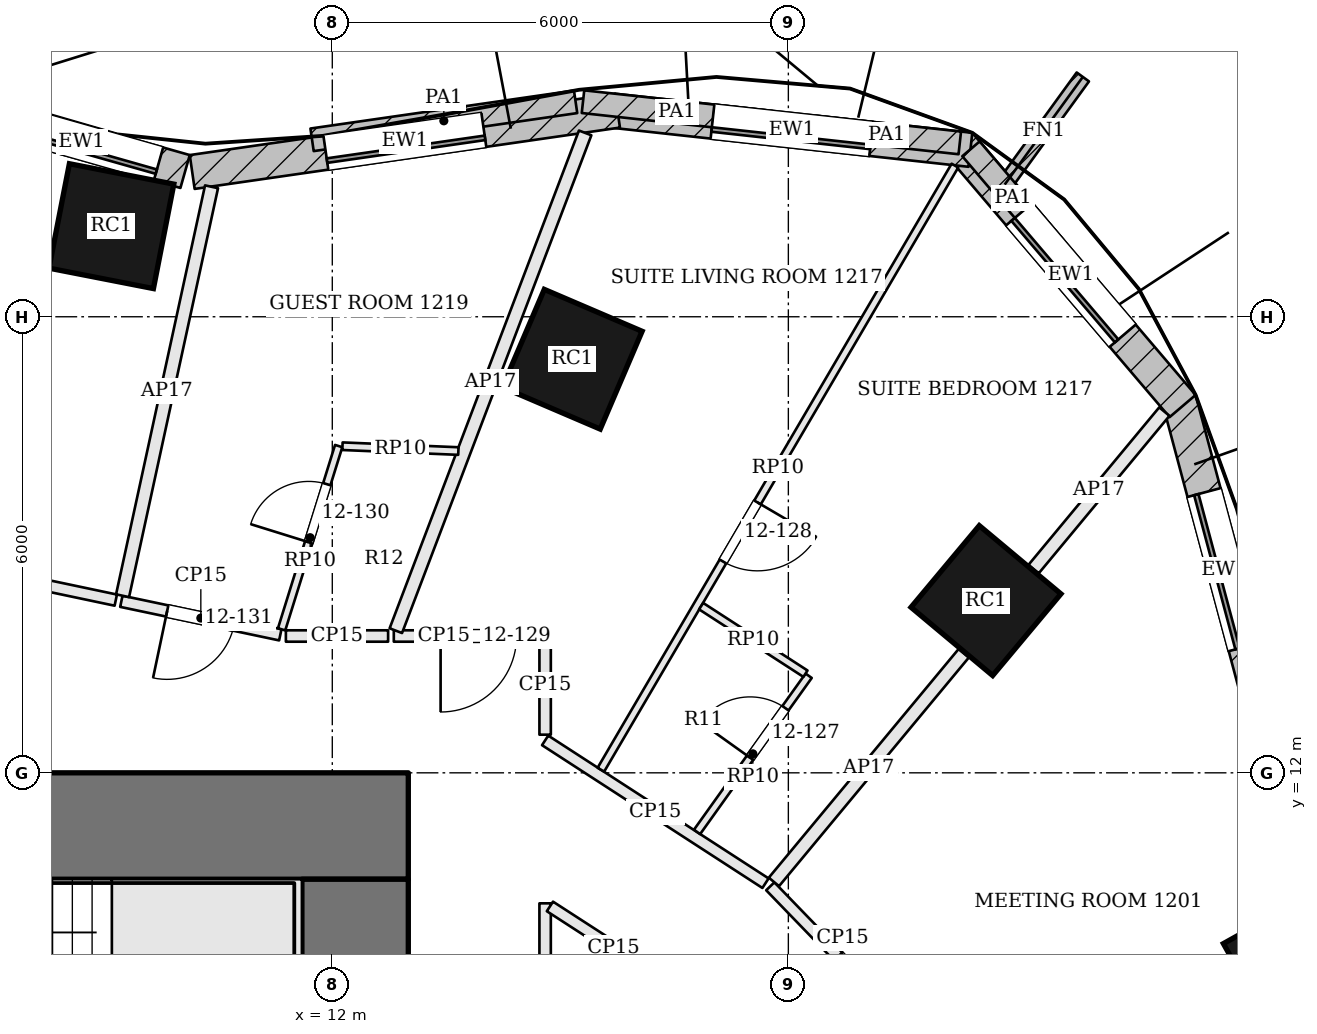
"""IFC4 building model, lengths in metres.
Left out: names, types, materials, properties, quantities, classifications, styles, units other than length and angle.
Written with IfcOpenShell. Run it as: python <this file> out.ifc"""

import sys

from ifc_helpers import new_model, si_unit, direction, frame, frame_2d, origin, origin_2d, place, context, subcontext, project, spatial, rectangle, extrude, element, fill, save


model = new_model("IFC4")
c1 = context("Model", 3, precision=1e-05, world=origin(), true_north=direction((0.0, 1.0)))
c2 = subcontext(c1, "Body", "Model", "MODEL_VIEW")
j1 = project(units=[si_unit("LENGTHUNIT", "METRE"), si_unit("PLANEANGLEUNIT", "RADIAN")], contexts=[c1])
p1 = place(None, origin())
s1 = spatial("IfcSite", under=j1, at=p1, CompositionType="ELEMENT")
p2 = place(p1, origin())
s2 = spatial("IfcBuilding", under=s1, at=p2, CompositionType="ELEMENT")
p3 = place(p2, frame((0.0, 0.0, 59.1)))
s3 = spatial("IfcBuildingStorey", under=s2, at=p3, CompositionType="ELEMENT", Elevation=59.1)
p4 = place(p3, frame((-13.0, 11.3, 0.0), z_axis=(0.0, 0.0, 1.0), x_axis=(1.0, 0.0, 0.0)))
e1 = element("IfcWall", 1, at=p4, inside=s3, PredefinedType="SHEAR", context=c2, shape_type="SweptSolid", body=[
    extrude(rectangle(XDim=26.0, YDim=1.4, at=frame_2d((13.0, 0.0))), origin(), (0.0, 0.0, 1.0), 3.6),
])
p5 = place(p4, frame((8.825, 0.0, 0.0)))
e2 = element("IfcOpeningElement", 2, at=p5, cuts=e1, PredefinedType="OPENING", context=c2, shape_type="SweptSolid", body=[
    extrude(rectangle(XDim=1.0, YDim=2.1, at=frame_2d((0.5, 1.05))), frame((0.0, 0.71, 0.0), z_axis=(0.0, -1.0, 0.0), x_axis=(1.0, 0.0, 0.0)), (0.0, 0.0, 1.0), 1.42),
])
p6 = place(p4, frame((12.1, 0.0, 0.0)))
e3 = element("IfcOpeningElement", 3, at=p6, cuts=e1, PredefinedType="OPENING", context=c2, shape_type="SweptSolid", body=[
    extrude(rectangle(XDim=1.0, YDim=2.1, at=frame_2d((0.5, 1.05))), frame((0.0, 0.71, 0.0), z_axis=(0.0, -1.0, 0.0), x_axis=(1.0, 0.0, 0.0)), (0.0, 0.0, 1.0), 1.42),
])
p7 = place(p4, frame((15.125, 0.0, 0.0)))
e4 = element("IfcOpeningElement", 4, at=p7, cuts=e1, PredefinedType="OPENING", context=c2, shape_type="SweptSolid", body=[
    extrude(rectangle(XDim=0.7, YDim=2.1, at=frame_2d((0.35, 1.05))), frame((0.0, 0.71, 0.0), z_axis=(0.0, -1.0, 0.0), x_axis=(1.0, 0.0, 0.0)), (0.0, 0.0, 1.0), 1.42),
])
p8 = place(p4, frame((16.65, 0.0, 0.0)))
e5 = element("IfcOpeningElement", 5, at=p8, cuts=e1, PredefinedType="OPENING", context=c2, shape_type="SweptSolid", body=[
    extrude(rectangle(XDim=0.9, YDim=2.1, at=frame_2d((0.45, 1.05))), frame((0.0, 0.71, 0.0), z_axis=(0.0, -1.0, 0.0), x_axis=(1.0, 0.0, 0.0)), (0.0, 0.0, 1.0), 1.42),
])
p9 = place(p3, frame((12.3, -1.6, 0.0), z_axis=(0.0, 0.0, 1.0), x_axis=(0.0, 1.0, 0.0)))
e6 = element("IfcWall", 6, at=p9, inside=s3, PredefinedType="SHEAR", context=c2, shape_type="SweptSolid", body=[
    extrude(rectangle(XDim=12.2, YDim=1.4, at=frame_2d((6.1, 0.0))), origin(), (0.0, 0.0, 1.0), 3.6),
])
p10 = place(p9, frame((6.8, 0.0, 0.0)))
e7 = element("IfcOpeningElement", 7, at=p10, cuts=e6, PredefinedType="OPENING", context=c2, shape_type="SweptSolid", body=[
    extrude(rectangle(XDim=1.8, YDim=2.1, at=frame_2d((0.9, 1.05))), frame((0.0, 0.71, 0.0), z_axis=(0.0, -1.0, 0.0), x_axis=(1.0, 0.0, 0.0)), (0.0, 0.0, 1.0), 1.42),
])
for number, where, z_axis, x_axis in (
    (8, (24.676, 9.483, 0.0), (0.0, 0.0, 1.0), (-0.487, 0.873, 0.0)),
    (9, (20.6, 14.266, 0.0), (0.0, 0.0, 1.0), (-0.767, 0.641, 0.0)),
    (10, (15.157, 17.441, 0.0), (0.0, 0.0, 1.0), (-0.919, 0.394, 0.0)),
    (11, (9.094, 19.192, 0.0), (0.0, 0.0, 1.0), (-0.981, 0.192, 0.0)),
):
    element("IfcColumn", number, at=place(p3, frame(where, z_axis=z_axis, x_axis=x_axis)), inside=s3, PredefinedType="COLUMN", context=c2, shape_type="SweptSolid", body=[
        extrude(rectangle(XDim=1.4, YDim=1.4, at=origin_2d()), origin(), (0.0, 0.0, 1.0), 3.6),
    ])
p11 = place(p3, frame((24.337, 12.439, 0.0), z_axis=(0.0, 0.0, 1.0), x_axis=(-0.258441377569, 0.966026942875, 0.0)))
e12 = element("IfcWall", 12, at=p11, inside=s3, PredefinedType="SOLIDWALL", context=c2, shape_type="SweptSolid", body=[
    extrude(rectangle(XDim=4.624, YDim=0.45, at=frame_2d((2.312, 0.0))), origin(), (0.0, 0.0, 1.0), 3.4),
])
p12 = place(p11, frame((1.262, 0.0, 0.9)))
e13 = element("IfcOpeningElement", 13, at=p12, cuts=e12, PredefinedType="OPENING", context=c2, shape_type="SweptSolid", body=[
    extrude(rectangle(XDim=2.1, YDim=2.0, at=frame_2d((1.05, 1.0))), frame((0.0, 0.235, 0.0), z_axis=(0.0, -1.0, 0.0), x_axis=(1.0, 0.0, 0.0)), (0.0, 0.0, 1.0), 0.47),
])
p13 = place(p3, frame((23.187, 16.825, 0.0), z_axis=(0.0, 0.0, 1.0), x_axis=(-0.648462985992, 0.761246186065, 0.0)))
e14 = element("IfcWall", 14, at=p13, inside=s3, PredefinedType="SOLIDWALL", context=c2, shape_type="SweptSolid", body=[
    extrude(rectangle(XDim=4.531, YDim=0.45, at=frame_2d((2.265, 0.0))), origin(), (0.0, 0.0, 1.0), 3.4),
])
p14 = place(p13, frame((1.215, 0.0, 0.9)))
e15 = element("IfcOpeningElement", 15, at=p14, cuts=e14, PredefinedType="OPENING", context=c2, shape_type="SweptSolid", body=[
    extrude(rectangle(XDim=2.1, YDim=2.0, at=frame_2d((1.05, 1.0))), frame((0.0, 0.235, 0.0), z_axis=(0.0, -1.0, 0.0), x_axis=(1.0, 0.0, 0.0)), (0.0, 0.0, 1.0), 0.47),
])
p15 = place(p3, frame((20.396, 20.196, 0.0), z_axis=(0.0, 0.0, 1.0), x_axis=(-0.994063142291, 0.108804729393, 0.0)))
e16 = element("IfcWall", 16, at=p15, inside=s3, PredefinedType="SOLIDWALL", context=c2, shape_type="SweptSolid", body=[
    extrude(rectangle(XDim=4.728, YDim=0.45, at=frame_2d((2.364, 0.0))), origin(), (0.0, 0.0, 1.0), 3.4),
])
p16 = place(p15, frame((1.314, 0.0, 0.9)))
e17 = element("IfcOpeningElement", 17, at=p16, cuts=e16, PredefinedType="OPENING", context=c2, shape_type="SweptSolid", body=[
    extrude(rectangle(XDim=2.1, YDim=2.0, at=frame_2d((1.05, 1.0))), frame((0.0, 0.235, 0.0), z_axis=(0.0, -1.0, 0.0), x_axis=(1.0, 0.0, 0.0)), (0.0, 0.0, 1.0), 0.47),
])
p17 = place(p3, frame((15.752, 20.711, 0.0), z_axis=(0.0, 0.0, 1.0), x_axis=(-0.989761192351, -0.142733255115, 0.0)))
e18 = element("IfcWall", 18, at=p17, inside=s3, PredefinedType="SOLIDWALL", context=c2, shape_type="SweptSolid", body=[
    extrude(rectangle(XDim=5.653, YDim=0.45, at=frame_2d((2.827, 0.0))), origin(), (0.0, 0.0, 1.0), 3.4),
])
p18 = place(p17, frame((1.777, 0.0, 0.9)))
e19 = element("IfcOpeningElement", 19, at=p18, cuts=e18, PredefinedType="OPENING", context=c2, shape_type="SweptSolid", body=[
    extrude(rectangle(XDim=2.1, YDim=2.0, at=frame_2d((1.05, 1.0))), frame((0.0, 0.235, 0.0), z_axis=(0.0, -1.0, 0.0), x_axis=(1.0, 0.0, 0.0)), (0.0, 0.0, 1.0), 0.47),
])
p19 = place(p3, frame((10.063, 19.911, 0.0), z_axis=(0.0, 0.0, 1.0), x_axis=(-0.961982029567, 0.273112751057, 0.0)))
e20 = element("IfcWall", 20, at=p19, inside=s3, PredefinedType="SOLIDWALL", context=c2, shape_type="SweptSolid", body=[
    extrude(rectangle(XDim=2.827, YDim=0.45, at=frame_2d((1.414, 0.0))), origin(), (0.0, 0.0, 1.0), 3.4),
])
p20 = place(p19, frame((0.364, 0.0, 0.9)))
e21 = element("IfcOpeningElement", 21, at=p20, cuts=e20, PredefinedType="OPENING", context=c2, shape_type="SweptSolid", body=[
    extrude(rectangle(XDim=2.1, YDim=2.0, at=frame_2d((1.05, 1.0))), frame((0.0, 0.235, 0.0), z_axis=(0.0, -1.0, 0.0), x_axis=(1.0, 0.0, 0.0)), (0.0, 0.0, 1.0), 0.47),
])
p21 = place(p3, frame((20.846, 19.739, 0.0), z_axis=(0.0, 0.0, 1.0), x_axis=(0.587607490034, 0.809146116382, 0.0)))
e22 = element("IfcWall", 22, at=p21, inside=s3, PredefinedType="SOLIDWALL", context=c2, shape_type="SweptSolid", body=[
    extrude(rectangle(XDim=1.75, YDim=0.2, at=frame_2d((0.875, 0.0))), origin(), (0.0, 0.0, 1.0), 3.4),
])
p22 = place(p3, frame((21.513, 18.906, 3.6), z_axis=(0.0, 0.0, 1.0), x_axis=(-0.648451151452, 0.761256267088, 0.0)))
e23 = element("IfcWall", 23, at=p22, inside=s3, PredefinedType="PARAPET", context=c2, shape_type="SweptSolid", body=[
    extrude(rectangle(XDim=1.712, YDim=0.3, at=frame_2d((0.856, 0.0))), origin(), (0.0, 0.0, 1.0), 1.1),
])
p23 = place(p3, frame((20.255, 20.287, 3.6), z_axis=(0.0, 0.0, 1.0), x_axis=(-0.994062724773, 0.108808543863, 0.0)))
e24 = element("IfcWall", 24, at=p23, inside=s3, PredefinedType="PARAPET", context=c2, shape_type="SweptSolid", body=[
    extrude(rectangle(XDim=1.932, YDim=0.3, at=frame_2d((0.966, 0.0))), origin(), (0.0, 0.0, 1.0), 1.1),
])
p24 = place(p3, frame((17.772, 20.559, 3.6), z_axis=(0.0, 0.0, 1.0), x_axis=(-0.994063072833, 0.108805363973, 0.0)))
e25 = element("IfcWall", 25, at=p24, inside=s3, PredefinedType="PARAPET", context=c2, shape_type="SweptSolid", body=[
    extrude(rectangle(XDim=2.489, YDim=0.3, at=frame_2d((1.244, 0.0))), origin(), (0.0, 0.0, 1.0), 1.1),
])
p25 = place(p3, frame((15.201, 20.828, 3.6), z_axis=(0.0, 0.0, 1.0), x_axis=(-0.989761856496, -0.142728649634, 0.0)))
e26 = element("IfcWall", 26, at=p25, inside=s3, PredefinedType="PARAPET", context=c2, shape_type="SweptSolid", body=[
    extrude(rectangle(XDim=3.503, YDim=0.3, at=frame_2d((1.751, 0.0))), origin(), (0.0, 0.0, 1.0), 1.1),
])
p26 = place(p3, frame((19.663, 8.542, 0.0), z_axis=(0.0, 0.0, 1.0), x_axis=(-0.695220577526, 0.718796458383, 0.0)))
e27 = element("IfcWall", 27, at=p26, inside=s3, PredefinedType="PARTITIONING", context=c2, shape_type="SweptSolid", body=[
    extrude(rectangle(XDim=2.734, YDim=0.15, at=frame_2d((1.367, 0.0))), origin(), (0.0, 0.0, 1.0), 2.68),
])
p27 = place(p26, frame((0.45, 0.0, 0.0)))
e28 = element("IfcOpeningElement", 28, at=p27, cuts=e27, PredefinedType="OPENING", context=c2, shape_type="SweptSolid", body=[
    extrude(rectangle(XDim=1.0, YDim=2.4, at=frame_2d((0.5, 1.2))), frame((0.0, 0.085, 0.0), z_axis=(0.0, -1.0, 0.0), x_axis=(1.0, 0.0, 0.0)), (0.0, 0.0, 1.0), 0.17),
])
p28 = place(p3, frame((22.947, 16.752, 0.0), z_axis=(0.0, 0.0, 1.0), x_axis=(-0.638756388383, -0.769409043552, 0.0)))
e29 = element("IfcWall", 29, at=p28, inside=s3, PredefinedType="PARTITIONING", context=c2, shape_type="SweptSolid", body=[
    extrude(rectangle(XDim=2.693, YDim=0.175, at=frame_2d((1.346, 0.0))), origin(), (0.0, 0.0, 1.0), 2.68),
])
p29 = place(p3, frame((20.307, 13.573, 0.0), z_axis=(0.0, 0.0, 1.0), x_axis=(-0.638751887509, -0.769412780114, 0.0)))
e30 = element("IfcWall", 30, at=p29, inside=s3, PredefinedType="PARTITIONING", context=c2, shape_type="SweptSolid", body=[
    extrude(rectangle(XDim=3.909, YDim=0.175, at=frame_2d((1.955, 0.0))), origin(), (0.0, 0.0, 1.0), 2.68),
])
p30 = place(p3, frame((17.699, 10.548, 0.0), z_axis=(0.0, 0.0, 1.0), x_axis=(-0.839188825453, 0.54384015596, 0.0)))
e31 = element("IfcWall", 31, at=p30, inside=s3, PredefinedType="PARTITIONING", context=c2, shape_type="SweptSolid", body=[
    extrude(rectangle(XDim=3.454, YDim=0.15, at=frame_2d((1.727, 0.0))), origin(), (0.0, 0.0, 1.0), 2.68),
])
p31 = place(p3, frame((14.8, 12.502, 0.0), z_axis=(0.0, 0.0, 1.0), x_axis=(-0.000188040613, 0.99999998232, 0.0)))
e32 = element("IfcWall", 32, at=p31, inside=s3, PredefinedType="PARTITIONING", context=c2, shape_type="SweptSolid", body=[
    extrude(rectangle(XDim=1.298, YDim=0.15, at=frame_2d((0.649, 0.0))), origin(), (0.0, 0.0, 1.0), 2.68),
])
p32 = place(p3, frame((14.725, 13.8, 0.0), z_axis=(0.0, 0.0, 1.0), x_axis=(-1.0, 0.0, 0.0)))
e33 = element("IfcWall", 33, at=p32, inside=s3, PredefinedType="PARTITIONING", context=c2, shape_type="SweptSolid", body=[
    extrude(rectangle(XDim=1.916, YDim=0.15, at=frame_2d((0.958, 0.0))), origin(), (0.0, 0.0, 1.0), 2.68),
])
p33 = place(p32, frame((0.3, 0.0, 0.0)))
e34 = element("IfcOpeningElement", 34, at=p33, cuts=e33, PredefinedType="OPENING", context=c2, shape_type="SweptSolid", body=[
    extrude(rectangle(XDim=1.0, YDim=2.1, at=frame_2d((0.5, 1.05))), frame((0.0, 0.085, 0.0), z_axis=(0.0, -1.0, 0.0), x_axis=(1.0, 0.0, 0.0)), (0.0, 0.0, 1.0), 0.17),
])
p34 = place(p3, frame((15.327, 20.419, 0.0), z_axis=(0.0, 0.0, 1.0), x_axis=(-0.355499704179, -0.934676393373, 0.0)))
e35 = element("IfcWall", 35, at=p34, inside=s3, PredefinedType="PARTITIONING", context=c2, shape_type="SweptSolid", body=[
    extrude(rectangle(XDim=7.006, YDim=0.175, at=frame_2d((3.503, 0.0))), origin(), (0.0, 0.0, 1.0), 2.68),
])
p35 = place(p3, frame((12.734, 13.8, 0.0), z_axis=(0.0, 0.0, 1.0), x_axis=(-1.0, 0.0, 0.0)))
e36 = element("IfcWall", 36, at=p35, inside=s3, PredefinedType="PARTITIONING", context=c2, shape_type="SweptSolid", body=[
    extrude(rectangle(XDim=1.345, YDim=0.15, at=frame_2d((0.672, 0.0))), origin(), (0.0, 0.0, 1.0), 2.68),
])
p36 = place(p3, frame((11.316, 13.815, 0.0), z_axis=(0.0, 0.0, 1.0), x_axis=(-0.978461212154, 0.206430754275, 0.0)))
e37 = element("IfcWall", 37, at=p36, inside=s3, PredefinedType="PARTITIONING", context=c2, shape_type="SweptSolid", body=[
    extrude(rectangle(XDim=2.137, YDim=0.15, at=frame_2d((1.069, 0.0))), origin(), (0.0, 0.0, 1.0), 2.68),
])
p37 = place(p36, frame((0.621, 0.0, 0.0)))
e38 = element("IfcOpeningElement", 38, at=p37, cuts=e37, PredefinedType="OPENING", context=c2, shape_type="SweptSolid", body=[
    extrude(rectangle(XDim=0.9, YDim=2.4, at=frame_2d((0.45, 1.2))), frame((0.0, 0.085, 0.0), z_axis=(0.0, -1.0, 0.0), x_axis=(1.0, 0.0, 0.0)), (0.0, 0.0, 1.0), 0.17),
])
p38 = place(p3, frame((10.411, 19.71, 0.0), z_axis=(0.0, 0.0, 1.0), x_axis=(-0.212613726561, -0.977136327888, 0.0)))
e39 = element("IfcWall", 39, at=p38, inside=s3, PredefinedType="PARTITIONING", context=c2, shape_type="SweptSolid", body=[
    extrude(rectangle(XDim=5.506, YDim=0.175, at=frame_2d((2.753, 0.0))), origin(), (0.0, 0.0, 1.0), 2.68),
])
p39 = place(p3, frame((9.152, 14.272, 0.0), z_axis=(0.0, 0.0, 1.0), x_axis=(-0.978472647326, 0.206376545266, 0.0)))
e40 = element("IfcWall", 40, at=p39, inside=s3, PredefinedType="PARTITIONING", context=c2, shape_type="SweptSolid", body=[
    extrude(rectangle(XDim=2.857, YDim=0.15, at=frame_2d((1.428, 0.0))), origin(), (0.0, 0.0, 1.0), 2.68),
])
p40 = place(p3, frame((14.8, -4.725, 0.0), z_axis=(0.0, 0.0, 1.0), x_axis=(0.0, 1.0, 0.0)))
e41 = element("IfcWall", 41, at=p40, inside=s3, PredefinedType="PARTITIONING", context=c2, shape_type="SweptSolid", body=[
    extrude(rectangle(XDim=15.008, YDim=0.15, at=frame_2d((7.504, 0.0))), origin(), (0.0, 0.0, 1.0), 2.68),
])
p41 = place(p40, frame((6.566, 0.0, 0.0)))
e42 = element("IfcOpeningElement", 42, at=p41, cuts=e41, PredefinedType="OPENING", context=c2, shape_type="SweptSolid", body=[
    extrude(rectangle(XDim=1.8, YDim=2.1, at=frame_2d((0.9, 1.05))), frame((0.0, 0.085, 0.0), z_axis=(0.0, -1.0, 0.0), x_axis=(1.0, 0.0, 0.0)), (0.0, 0.0, 1.0), 0.17),
])
p42 = place(p3, frame((14.863, 10.242, 0.0), z_axis=(0.0, 0.0, 1.0), x_axis=(0.839530811724, -0.543312079901, 0.0)))
e43 = element("IfcWall", 43, at=p42, inside=s3, PredefinedType="PARTITIONING", context=c2, shape_type="SweptSolid", body=[
    extrude(rectangle(XDim=1.998, YDim=0.15, at=frame_2d((0.999, 0.0))), origin(), (0.0, 0.0, 1.0), 2.68),
])
p43 = place(p3, frame((20.191, 19.988, 0.0), z_axis=(0.0, 0.0, 1.0), x_axis=(-0.505620182585, -0.862756182802, 0.0)))
e44 = element("IfcWall", 44, at=p43, inside=s3, PredefinedType="PARTITIONING", context=c2, shape_type="SweptSolid", body=[
    extrude(rectangle(XDim=9.211, YDim=0.1, at=frame_2d((4.605, 0.0))), origin(), (0.0, 0.0, 1.0), 2.898),
])
p44 = place(p43, frame((5.136, 0.0, 0.0)))
e45 = element("IfcOpeningElement", 45, at=p44, cuts=e44, PredefinedType="OPENING", context=c2, shape_type="SweptSolid", body=[
    extrude(rectangle(XDim=0.9, YDim=2.4, at=frame_2d((0.45, 1.2))), frame((0.0, 0.06, 0.0), z_axis=(0.0, -1.0, 0.0), x_axis=(1.0, 0.0, 0.0)), (0.0, 0.0, 1.0), 0.12),
])
p45 = place(p3, frame((16.799, 11.223, 0.0), z_axis=(0.0, 0.0, 1.0), x_axis=(0.581494263037, 0.81355050369, 0.0)))
e46 = element("IfcWall", 46, at=p45, inside=s3, PredefinedType="PARTITIONING", context=c2, shape_type="SweptSolid", body=[
    extrude(rectangle(XDim=2.525, YDim=0.1, at=frame_2d((1.262, 0.0))), origin(), (0.0, 0.0, 1.0), 2.898),
])
p46 = place(p45, frame((1.2, 0.0, 0.0)))
e47 = element("IfcOpeningElement", 47, at=p46, cuts=e46, PredefinedType="OPENING", context=c2, shape_type="SweptSolid", body=[
    extrude(rectangle(XDim=0.8, YDim=2.1, at=frame_2d((0.4, 1.05))), frame((0.0, 0.06, 0.0), z_axis=(0.0, -1.0, 0.0), x_axis=(1.0, 0.0, 0.0)), (0.0, 0.0, 1.0), 0.12),
])
p47 = place(p3, frame((18.225, 13.304, 0.0), z_axis=(0.0, 0.0, 1.0), x_axis=(-0.839486017112, 0.543381290692, 0.0)))
e48 = element("IfcWall", 48, at=p47, inside=s3, PredefinedType="PARTITIONING", context=c2, shape_type="SweptSolid", body=[
    extrude(rectangle(XDim=1.635, YDim=0.1, at=frame_2d((0.817, 0.0))), origin(), (0.0, 0.0, 1.0), 2.898),
])
p48 = place(p3, frame((11.333, 13.888, 0.0), z_axis=(0.0, 0.0, 1.0), x_axis=(0.297311415603, 0.954780562303, 0.0)))
e49 = element("IfcWall", 49, at=p48, inside=s3, PredefinedType="PARTITIONING", context=c2, shape_type="SweptSolid", body=[
    extrude(rectangle(XDim=2.525, YDim=0.1, at=frame_2d((1.263, 0.0))), origin(), (0.0, 0.0, 1.0), 2.898),
])
p49 = place(p48, frame((1.2, 0.0, 0.0)))
e50 = element("IfcOpeningElement", 50, at=p49, cuts=e49, PredefinedType="OPENING", context=c2, shape_type="SweptSolid", body=[
    extrude(rectangle(XDim=0.8, YDim=2.1, at=frame_2d((0.4, 1.05))), frame((0.0, 0.06, 0.0), z_axis=(0.0, -1.0, 0.0), x_axis=(1.0, 0.0, 0.0)), (0.0, 0.0, 1.0), 0.12),
])
p50 = place(p3, frame((12.134, 16.297, 0.0), z_axis=(0.0, 0.0, 1.0), x_axis=(0.999134735698, -0.041590623004, 0.0)))
e51 = element("IfcWall", 51, at=p50, inside=s3, PredefinedType="PARTITIONING", context=c2, shape_type="SweptSolid", body=[
    extrude(rectangle(XDim=1.526, YDim=0.1, at=frame_2d((0.763, 0.0))), origin(), (0.0, 0.0, 1.0), 2.898),
])
p51 = place(p12, origin())
e52 = element("IfcWindow", 52, at=p51, inside=s3, PartitioningType="SINGLE_PANEL", PredefinedType="WINDOW", context=c2, shape_type="SweptSolid", body=[
    extrude(rectangle(XDim=2.1, YDim=2.0, at=frame_2d((1.05, 1.0))), frame((0.0, 0.135, 0.0), z_axis=(0.0, -1.0, 0.0), x_axis=(1.0, 0.0, 0.0)), (0.0, 0.0, 1.0), 0.06),
])
fill(e13, e52)
p52 = place(p14, origin())
e53 = element("IfcWindow", 53, at=p52, inside=s3, PartitioningType="SINGLE_PANEL", PredefinedType="WINDOW", context=c2, shape_type="SweptSolid", body=[
    extrude(rectangle(XDim=2.1, YDim=2.0, at=frame_2d((1.05, 1.0))), frame((0.0, 0.135, 0.0), z_axis=(0.0, -1.0, 0.0), x_axis=(1.0, 0.0, 0.0)), (0.0, 0.0, 1.0), 0.06),
])
fill(e15, e53)
p53 = place(p16, origin())
e54 = element("IfcWindow", 54, at=p53, inside=s3, PartitioningType="SINGLE_PANEL", PredefinedType="WINDOW", context=c2, shape_type="SweptSolid", body=[
    extrude(rectangle(XDim=2.1, YDim=2.0, at=frame_2d((1.05, 1.0))), frame((0.0, 0.135, 0.0), z_axis=(0.0, -1.0, 0.0), x_axis=(1.0, 0.0, 0.0)), (0.0, 0.0, 1.0), 0.06),
])
fill(e17, e54)
p54 = place(p18, origin())
e55 = element("IfcWindow", 55, at=p54, inside=s3, PartitioningType="SINGLE_PANEL", PredefinedType="WINDOW", context=c2, shape_type="SweptSolid", body=[
    extrude(rectangle(XDim=2.1, YDim=2.0, at=frame_2d((1.05, 1.0))), frame((0.0, 0.135, 0.0), z_axis=(0.0, -1.0, 0.0), x_axis=(1.0, 0.0, 0.0)), (0.0, 0.0, 1.0), 0.06),
])
fill(e19, e55)
p55 = place(p20, origin())
e56 = element("IfcWindow", 56, at=p55, inside=s3, PartitioningType="SINGLE_PANEL", PredefinedType="WINDOW", context=c2, shape_type="SweptSolid", body=[
    extrude(rectangle(XDim=2.1, YDim=2.0, at=frame_2d((1.05, 1.0))), frame((0.0, 0.135, 0.0), z_axis=(0.0, -1.0, 0.0), x_axis=(1.0, 0.0, 0.0)), (0.0, 0.0, 1.0), 0.06),
])
fill(e21, e56)
p56 = place(p46, origin())
e57 = element("IfcDoor", 57, at=p56, inside=s3, OperationType="SINGLE_SWING_LEFT", PredefinedType="DOOR", context=c2, shape_type="SweptSolid", body=[
    extrude(rectangle(XDim=0.8, YDim=2.1, at=frame_2d((0.4, 1.05))), frame((0.0, 0.025, 0.0), z_axis=(0.0, -1.0, 0.0), x_axis=(1.0, 0.0, 0.0)), (0.0, 0.0, 1.0), 0.05),
])
fill(e47, e57)
p57 = place(p44, origin())
e58 = element("IfcDoor", 58, at=p57, inside=s3, OperationType="SINGLE_SWING_LEFT", PredefinedType="DOOR", context=c2, shape_type="SweptSolid", body=[
    extrude(rectangle(XDim=0.9, YDim=2.4, at=frame_2d((0.45, 1.2))), frame((0.0, 0.025, 0.0), z_axis=(0.0, -1.0, 0.0), x_axis=(1.0, 0.0, 0.0)), (0.0, 0.0, 1.0), 0.05),
])
fill(e45, e58)
p58 = place(p33, origin())
e59 = element("IfcDoor", 59, at=p58, inside=s3, OperationType="SINGLE_SWING_RIGHT", PredefinedType="DOOR", context=c2, shape_type="SweptSolid", body=[
    extrude(rectangle(XDim=1.0, YDim=2.1, at=frame_2d((0.5, 1.05))), frame((0.0, 0.025, 0.0), z_axis=(0.0, -1.0, 0.0), x_axis=(1.0, 0.0, 0.0)), (0.0, 0.0, 1.0), 0.05),
])
fill(e34, e59)
p59 = place(p49, origin())
e60 = element("IfcDoor", 60, at=p59, inside=s3, OperationType="SINGLE_SWING_LEFT", PredefinedType="DOOR", context=c2, shape_type="SweptSolid", body=[
    extrude(rectangle(XDim=0.8, YDim=2.1, at=frame_2d((0.4, 1.05))), frame((0.0, 0.025, 0.0), z_axis=(0.0, -1.0, 0.0), x_axis=(1.0, 0.0, 0.0)), (0.0, 0.0, 1.0), 0.05),
])
fill(e50, e60)
p60 = place(p37, origin())
e61 = element("IfcDoor", 61, at=p60, inside=s3, OperationType="SINGLE_SWING_RIGHT", PredefinedType="DOOR", context=c2, shape_type="SweptSolid", body=[
    extrude(rectangle(XDim=0.9, YDim=2.4, at=frame_2d((0.45, 1.2))), frame((0.0, 0.025, 0.0), z_axis=(0.0, -1.0, 0.0), x_axis=(1.0, 0.0, 0.0)), (0.0, 0.0, 1.0), 0.05),
])
fill(e38, e61)
save(model, sys.argv[1])
